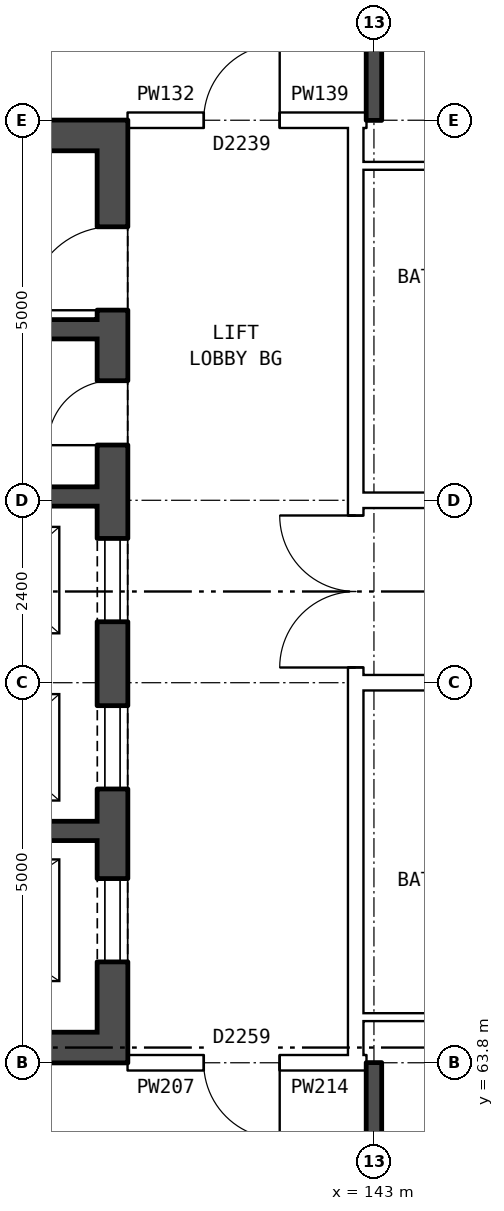
"""IFC4 building model, lengths in metres.
Left out: names, types, materials, properties, quantities, classifications, styles, units other than length and angle.
Written with IfcOpenShell. Run it as: python <this file> out.ifc"""

import sys

from ifc_helpers import new_model, si_unit, direction, frame, frame_2d, origin, place, context, subcontext, project, spatial, rectangle, extrude, element, fill, save


model = new_model("IFC4")
c1 = context("Model", 3, precision=1e-05, world=origin(), true_north=direction((0.0, 1.0)))
c2 = subcontext(c1, "Body", "Model", "MODEL_VIEW")
j1 = project(units=[si_unit("LENGTHUNIT", "METRE"), si_unit("PLANEANGLEUNIT", "RADIAN")], contexts=[c1])
p1 = place(None, origin())
s1 = spatial("IfcSite", under=j1, at=p1, CompositionType="ELEMENT")
p2 = place(p1, origin())
s2 = spatial("IfcBuilding", under=s1, at=p2, CompositionType="ELEMENT")
p3 = place(p2, frame((0.0, 0.0, 212.1)))
s3 = spatial("IfcBuildingStorey", under=s2, at=p3, CompositionType="ELEMENT", Elevation=212.1)
p4 = place(p3, frame((139.56, 63.8, 0.0), z_axis=(0.0, 0.0, 1.0), x_axis=(0.0, 1.0, 0.0)))
e1 = element("IfcWall", 1, at=p4, inside=s3, PredefinedType="SHEAR", context=c2, shape_type="SweptSolid", body=[
    extrude(rectangle(XDim=12.4, YDim=0.4, at=frame_2d((6.2, 0.0))), origin(), (0.0, 0.0, 1.0), 2.85),
])
p5 = place(p4, frame((1.325, 0.0, 0.0)))
e2 = element("IfcOpeningElement", 2, at=p5, cuts=e1, PredefinedType="OPENING", context=c2, shape_type="SweptSolid", body=[
    extrude(rectangle(XDim=1.1, YDim=2.1, at=frame_2d((0.55, 1.05))), frame((0.0, 0.21, 0.0), z_axis=(0.0, -1.0, 0.0), x_axis=(1.0, 0.0, 0.0)), (0.0, 0.0, 1.0), 0.42),
])
p6 = place(p4, frame((3.6, 0.0, 0.0)))
e3 = element("IfcOpeningElement", 3, at=p6, cuts=e1, PredefinedType="OPENING", context=c2, shape_type="SweptSolid", body=[
    extrude(rectangle(XDim=1.1, YDim=2.1, at=frame_2d((0.55, 1.05))), frame((0.0, 0.21, 0.0), z_axis=(0.0, -1.0, 0.0), x_axis=(1.0, 0.0, 0.0)), (0.0, 0.0, 1.0), 0.42),
])
p7 = place(p4, frame((5.8, 0.0, 0.0)))
e4 = element("IfcOpeningElement", 4, at=p7, cuts=e1, PredefinedType="OPENING", context=c2, shape_type="SweptSolid", body=[
    extrude(rectangle(XDim=1.1, YDim=2.1, at=frame_2d((0.55, 1.05))), frame((0.0, 0.21, 0.0), z_axis=(0.0, -1.0, 0.0), x_axis=(1.0, 0.0, 0.0)), (0.0, 0.0, 1.0), 0.42),
])
p8 = place(p4, frame((9.9, 0.0, 0.0)))
e5 = element("IfcOpeningElement", 5, at=p8, cuts=e1, PredefinedType="OPENING", context=c2, shape_type="SweptSolid", body=[
    extrude(rectangle(XDim=1.1, YDim=2.1, at=frame_2d((0.55, 1.05))), frame((0.0, 0.21, 0.0), z_axis=(0.0, -1.0, 0.0), x_axis=(1.0, 0.0, 0.0)), (0.0, 0.0, 1.0), 0.42),
])
p9 = place(p4, frame((8.125, 0.0, 0.0)))
e6 = element("IfcOpeningElement", 6, at=p9, cuts=e1, PredefinedType="OPENING", context=c2, shape_type="SweptSolid", body=[
    extrude(rectangle(XDim=0.85, YDim=2.1, at=frame_2d((0.425, 1.05))), frame((0.0, 0.21, 0.0), z_axis=(0.0, -1.0, 0.0), x_axis=(1.0, 0.0, 0.0)), (0.0, 0.0, 1.0), 0.42),
])
for number, where, z_axis, x_axis in (
    (7, (139.36, 64.0, 0.0), (0.0, 0.0, 1.0), (-1.0, 0.0, 0.0)),
    (8, (139.36, 76.0, 0.0), (0.0, 0.0, 1.0), (-1.0, 0.0, 0.0)),
):
    element("IfcWall", number, at=place(p3, frame(where, z_axis=z_axis, x_axis=x_axis)), inside=s3, PredefinedType="SHEAR", context=c2, shape_type="SweptSolid", body=[
        extrude(rectangle(XDim=7.6, YDim=0.4, at=frame_2d((3.8, 0.0))), origin(), (0.0, 0.0, 1.0), 2.85),
    ])
p10 = place(p3, frame((139.36, 66.85, 0.0), z_axis=(0.0, 0.0, 1.0), x_axis=(-1.0, 0.0, 0.0)))
e9 = element("IfcWall", 9, at=p10, inside=s3, PredefinedType="SHEAR", context=c2, shape_type="SweptSolid", body=[
    extrude(rectangle(XDim=4.775, YDim=0.25, at=frame_2d((2.388, 0.0))), origin(), (0.0, 0.0, 1.0), 2.85),
])
p11 = place(p3, frame((139.36, 71.25, 0.0), z_axis=(0.0, 0.0, 1.0), x_axis=(-1.0, 0.0, 0.0)))
e10 = element("IfcWall", 10, at=p11, inside=s3, PredefinedType="SHEAR", context=c2, shape_type="SweptSolid", body=[
    extrude(rectangle(XDim=7.6, YDim=0.25, at=frame_2d((3.8, 0.0))), origin(), (0.0, 0.0, 1.0), 2.85),
])
p12 = place(p11, frame((5.175, 0.0, 0.0)))
e11 = element("IfcOpeningElement", 11, at=p12, cuts=e10, PredefinedType="OPENING", context=c2, shape_type="SweptSolid", body=[
    extrude(rectangle(XDim=1.1, YDim=2.1, at=frame_2d((0.55, 1.05))), frame((0.0, 0.135, 0.0), z_axis=(0.0, -1.0, 0.0), x_axis=(1.0, 0.0, 0.0)), (0.0, 0.0, 1.0), 0.27),
])
p13 = place(p11, frame((3.35, 0.0, 0.0)))
e12 = element("IfcOpeningElement", 12, at=p13, cuts=e10, PredefinedType="OPENING", context=c2, shape_type="SweptSolid", body=[
    extrude(rectangle(XDim=0.85, YDim=2.1, at=frame_2d((0.425, 1.05))), frame((0.0, 0.135, 0.0), z_axis=(0.0, -1.0, 0.0), x_axis=(1.0, 0.0, 0.0)), (0.0, 0.0, 1.0), 0.27),
])
p14 = place(p3, frame((139.36, 73.45, 0.0), z_axis=(0.0, 0.0, 1.0), x_axis=(-1.0, 0.0, 0.0)))
e13 = element("IfcWall", 13, at=p14, inside=s3, PredefinedType="SHEAR", context=c2, shape_type="SweptSolid", body=[
    extrude(rectangle(XDim=2.525, YDim=0.25, at=frame_2d((1.263, 0.0))), origin(), (0.0, 0.0, 1.0), 2.85),
])
p15 = place(p3, frame((142.76, 63.9, 0.0), z_axis=(0.0, 0.0, 1.0), x_axis=(0.0, 1.0, 0.0)))
e14 = element("IfcWall", 14, at=p15, inside=s3, PredefinedType="PARTITIONING", context=c2, shape_type="SweptSolid", body=[
    extrude(rectangle(XDim=12.2, YDim=0.2, at=frame_2d((6.1, 0.0))), origin(), (0.0, 0.0, 1.0), 2.85),
])
p16 = place(p15, frame((5.1, 0.0, 0.0)))
e15 = element("IfcOpeningElement", 15, at=p16, cuts=e14, PredefinedType="OPENING", context=c2, shape_type="SweptSolid", body=[
    extrude(rectangle(XDim=2.0, YDim=2.1, at=frame_2d((1.0, 1.05))), frame((0.0, 0.11, 0.0), z_axis=(0.0, -1.0, 0.0), x_axis=(1.0, 0.0, 0.0)), (0.0, 0.0, 1.0), 0.22),
])
p17 = place(p3, frame((139.76, 63.8, 0.0), z_axis=(0.0, 0.0, 1.0), x_axis=(1.0, 0.0, 0.0)))
e16 = element("IfcWall", 16, at=p17, inside=s3, PredefinedType="PARTITIONING", context=c2, shape_type="SweptSolid", body=[
    extrude(rectangle(XDim=3.0, YDim=0.2, at=frame_2d((1.5, 0.0))), origin(), (0.0, 0.0, 1.0), 2.85),
])
p18 = place(p17, frame((1.0, 0.0, 0.0)))
e17 = element("IfcOpeningElement", 17, at=p18, cuts=e16, PredefinedType="OPENING", context=c2, shape_type="SweptSolid", body=[
    extrude(rectangle(XDim=1.0, YDim=2.1, at=frame_2d((0.5, 1.05))), frame((0.0, 0.11, 0.0), z_axis=(0.0, -1.0, 0.0), x_axis=(1.0, 0.0, 0.0)), (0.0, 0.0, 1.0), 0.22),
])
p19 = place(p3, frame((142.76, 63.8, 0.0), z_axis=(0.0, 0.0, 1.0), x_axis=(1.0, 0.0, 0.0)))
e18 = element("IfcWall", 18, at=p19, inside=s3, PredefinedType="PARTITIONING", context=c2, shape_type="SweptSolid", body=[
    extrude(rectangle(XDim=0.14, YDim=0.2, at=frame_2d((0.07, 0.0))), origin(), (0.0, 0.0, 1.0), 2.85),
])
p20 = place(p3, frame((142.76, 64.4, 0.0), z_axis=(0.0, 0.0, 1.0), x_axis=(1.0, 0.0, 0.0)))
e19 = element("IfcWall", 19, at=p20, inside=s3, PredefinedType="PARTITIONING", context=c2, shape_type="SweptSolid", body=[
    extrude(rectangle(XDim=3.24, YDim=0.1, at=frame_2d((1.62, 0.0))), origin(), (0.0, 0.0, 1.0), 2.85),
])
p21 = place(p3, frame((142.76, 68.8, 0.0), z_axis=(0.0, 0.0, 1.0), x_axis=(1.0, 0.0, 0.0)))
e20 = element("IfcWall", 20, at=p21, inside=s3, PredefinedType="PARTITIONING", context=c2, shape_type="SweptSolid", body=[
    extrude(rectangle(XDim=14.48, YDim=0.2, at=frame_2d((7.24, 0.0))), origin(), (0.0, 0.0, 1.0), 2.85),
])
p22 = place(p21, frame((4.24, 0.0, 0.0)))
e21 = element("IfcOpeningElement", 21, at=p22, cuts=e20, PredefinedType="OPENING", context=c2, shape_type="SweptSolid", body=[
    extrude(rectangle(XDim=1.0, YDim=2.1, at=frame_2d((0.5, 1.05))), frame((0.0, 0.11, 0.0), z_axis=(0.0, -1.0, 0.0), x_axis=(1.0, 0.0, 0.0)), (0.0, 0.0, 1.0), 0.22),
])
p23 = place(p21, frame((7.24, 0.0, 0.0)))
e22 = element("IfcOpeningElement", 22, at=p23, cuts=e20, PredefinedType="OPENING", context=c2, shape_type="SweptSolid", body=[
    extrude(rectangle(XDim=1.0, YDim=2.1, at=frame_2d((0.5, 1.05))), frame((0.0, 0.11, 0.0), z_axis=(0.0, -1.0, 0.0), x_axis=(1.0, 0.0, 0.0)), (0.0, 0.0, 1.0), 0.22),
])
p24 = place(p3, frame((142.76, 71.2, 0.0), z_axis=(0.0, 0.0, 1.0), x_axis=(1.0, 0.0, 0.0)))
e23 = element("IfcWall", 23, at=p24, inside=s3, PredefinedType="PARTITIONING", context=c2, shape_type="SweptSolid", body=[
    extrude(rectangle(XDim=14.48, YDim=0.2, at=frame_2d((7.24, 0.0))), origin(), (0.0, 0.0, 1.0), 2.85),
])
p25 = place(p24, frame((4.24, 0.0, 0.0)))
e24 = element("IfcOpeningElement", 24, at=p25, cuts=e23, PredefinedType="OPENING", context=c2, shape_type="SweptSolid", body=[
    extrude(rectangle(XDim=1.0, YDim=2.1, at=frame_2d((0.5, 1.05))), frame((0.0, 0.11, 0.0), z_axis=(0.0, -1.0, 0.0), x_axis=(1.0, 0.0, 0.0)), (0.0, 0.0, 1.0), 0.22),
])
p26 = place(p24, frame((7.24, 0.0, 0.0)))
e25 = element("IfcOpeningElement", 25, at=p26, cuts=e23, PredefinedType="OPENING", context=c2, shape_type="SweptSolid", body=[
    extrude(rectangle(XDim=1.0, YDim=2.1, at=frame_2d((0.5, 1.05))), frame((0.0, 0.11, 0.0), z_axis=(0.0, -1.0, 0.0), x_axis=(1.0, 0.0, 0.0)), (0.0, 0.0, 1.0), 0.22),
])
p27 = place(p3, frame((142.76, 75.6, 0.0), z_axis=(0.0, 0.0, 1.0), x_axis=(1.0, 0.0, 0.0)))
e26 = element("IfcWall", 26, at=p27, inside=s3, PredefinedType="PARTITIONING", context=c2, shape_type="SweptSolid", body=[
    extrude(rectangle(XDim=3.24, YDim=0.1, at=frame_2d((1.62, 0.0))), origin(), (0.0, 0.0, 1.0), 2.85),
])
p28 = place(p3, frame((139.76, 76.2, 0.0), z_axis=(0.0, 0.0, 1.0), x_axis=(1.0, 0.0, 0.0)))
e27 = element("IfcWall", 27, at=p28, inside=s3, PredefinedType="PARTITIONING", context=c2, shape_type="SweptSolid", body=[
    extrude(rectangle(XDim=3.0, YDim=0.2, at=frame_2d((1.5, 0.0))), origin(), (0.0, 0.0, 1.0), 2.85),
])
p29 = place(p28, frame((1.0, 0.0, 0.0)))
e28 = element("IfcOpeningElement", 28, at=p29, cuts=e27, PredefinedType="OPENING", context=c2, shape_type="SweptSolid", body=[
    extrude(rectangle(XDim=1.0, YDim=2.1, at=frame_2d((0.5, 1.05))), frame((0.0, 0.11, 0.0), z_axis=(0.0, -1.0, 0.0), x_axis=(1.0, 0.0, 0.0)), (0.0, 0.0, 1.0), 0.22),
])
p30 = place(p3, frame((142.76, 76.2, 0.0), z_axis=(0.0, 0.0, 1.0), x_axis=(1.0, 0.0, 0.0)))
e29 = element("IfcWall", 29, at=p30, inside=s3, PredefinedType="PARTITIONING", context=c2, shape_type="SweptSolid", body=[
    extrude(rectangle(XDim=0.14, YDim=0.2, at=frame_2d((0.07, 0.0))), origin(), (0.0, 0.0, 1.0), 2.85),
])
for number, where, z_axis, x_axis in (
    (30, (143.0, 54.36, 0.0), (0.0, 0.0, 1.0), (0.0, 1.0, 0.0)),
    (31, (143.0, 76.2, 0.0), (0.0, 0.0, 1.0), (0.0, 1.0, 0.0)),
):
    element("IfcWall", number, at=place(p3, frame(where, z_axis=z_axis, x_axis=x_axis)), inside=s3, PredefinedType="SOLIDWALL", context=c2, shape_type="SweptSolid", body=[
        extrude(rectangle(XDim=9.44, YDim=0.2, at=frame_2d((4.72, 0.0))), origin(), (0.0, 0.0, 1.0), 2.85),
    ])
p31 = place(p5, origin())
e32 = element("IfcDoor", 32, at=p31, inside=s3, OperationType="DOUBLE_DOOR_SLIDING", PredefinedType="DOOR", context=c2, shape_type="SweptSolid", body=[
    extrude(rectangle(XDim=1.1, YDim=2.1, at=frame_2d((0.55, 1.05))), frame((0.0, 0.185, 0.0), z_axis=(0.0, -1.0, 0.0), x_axis=(1.0, 0.0, 0.0)), (0.0, 0.0, 1.0), 0.05),
])
fill(e2, e32)
p32 = place(p6, origin())
e33 = element("IfcDoor", 33, at=p32, inside=s3, OperationType="DOUBLE_DOOR_SLIDING", PredefinedType="DOOR", context=c2, shape_type="SweptSolid", body=[
    extrude(rectangle(XDim=1.1, YDim=2.1, at=frame_2d((0.55, 1.05))), frame((0.0, 0.185, 0.0), z_axis=(0.0, -1.0, 0.0), x_axis=(1.0, 0.0, 0.0)), (0.0, 0.0, 1.0), 0.05),
])
fill(e3, e33)
p33 = place(p7, origin())
e34 = element("IfcDoor", 34, at=p33, inside=s3, OperationType="DOUBLE_DOOR_SLIDING", PredefinedType="DOOR", context=c2, shape_type="SweptSolid", body=[
    extrude(rectangle(XDim=1.1, YDim=2.1, at=frame_2d((0.55, 1.05))), frame((0.0, 0.185, 0.0), z_axis=(0.0, -1.0, 0.0), x_axis=(1.0, 0.0, 0.0)), (0.0, 0.0, 1.0), 0.05),
])
fill(e4, e34)
p34 = place(p8, origin())
e35 = element("IfcDoor", 35, at=p34, inside=s3, OperationType="SINGLE_SWING_LEFT", PredefinedType="DOOR", context=c2, shape_type="SweptSolid", body=[
    extrude(rectangle(XDim=1.1, YDim=2.1, at=frame_2d((0.55, 1.05))), frame((0.0, 0.185, 0.0), z_axis=(0.0, -1.0, 0.0), x_axis=(1.0, 0.0, 0.0)), (0.0, 0.0, 1.0), 0.05),
])
fill(e5, e35)
p35 = place(p9, origin())
e36 = element("IfcDoor", 36, at=p35, inside=s3, OperationType="SINGLE_SWING_LEFT", PredefinedType="DOOR", context=c2, shape_type="SweptSolid", body=[
    extrude(rectangle(XDim=0.85, YDim=2.1, at=frame_2d((0.425, 1.05))), frame((0.0, 0.185, 0.0), z_axis=(0.0, -1.0, 0.0), x_axis=(1.0, 0.0, 0.0)), (0.0, 0.0, 1.0), 0.05),
])
fill(e6, e36)
p36 = place(p16, origin())
e37 = element("IfcDoor", 37, at=p36, inside=s3, OperationType="DOUBLE_DOOR_SINGLE_SWING", PredefinedType="DOOR", context=c2, shape_type="SweptSolid", body=[
    extrude(rectangle(XDim=2.0, YDim=2.1, at=frame_2d((1.0, 1.05))), frame((0.0, 0.025, 0.0), z_axis=(0.0, -1.0, 0.0), x_axis=(1.0, 0.0, 0.0)), (0.0, 0.0, 1.0), 0.05),
])
fill(e15, e37)
p37 = place(p18, frame((1.0, 0.0, 0.0), z_axis=(0.0, 0.0, 1.0), x_axis=(-1.0, 0.0, 0.0)))
e38 = element("IfcDoor", 38, at=p37, inside=s3, OperationType="SINGLE_SWING_LEFT", PredefinedType="DOOR", context=c2, shape_type="SweptSolid", body=[
    extrude(rectangle(XDim=1.0, YDim=2.1, at=frame_2d((0.5, 1.05))), frame((0.0, 0.025, 0.0), z_axis=(0.0, -1.0, 0.0), x_axis=(1.0, 0.0, 0.0)), (0.0, 0.0, 1.0), 0.05),
])
fill(e17, e38)
p38 = place(p29, origin())
e39 = element("IfcDoor", 39, at=p38, inside=s3, OperationType="SINGLE_SWING_RIGHT", PredefinedType="DOOR", context=c2, shape_type="SweptSolid", body=[
    extrude(rectangle(XDim=1.0, YDim=2.1, at=frame_2d((0.5, 1.05))), frame((0.0, 0.025, 0.0), z_axis=(0.0, -1.0, 0.0), x_axis=(1.0, 0.0, 0.0)), (0.0, 0.0, 1.0), 0.05),
])
fill(e28, e39)
save(model, sys.argv[1])
